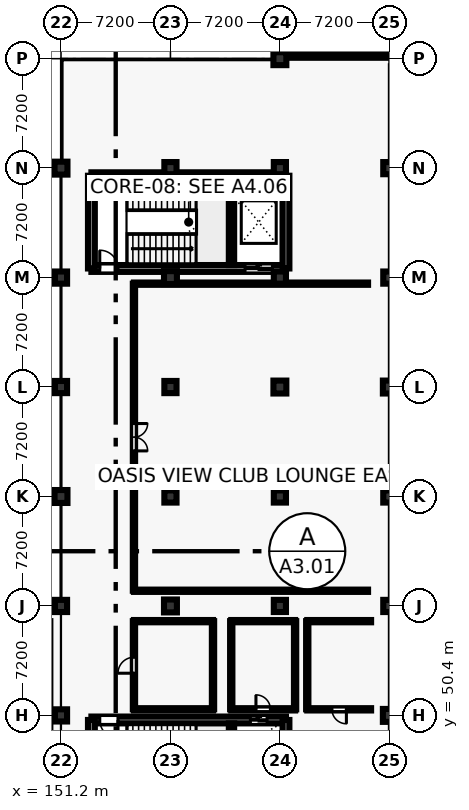
"""IFC4 building model, lengths in metres.
Left out: names, types, materials, properties, quantities, classifications, styles, units other than length and angle.
Written with IfcOpenShell. Run it as: python <this file> out.ifc"""

import sys

from ifc_helpers import new_model, si_unit, direction, frame, frame_2d, origin, origin_2d, place, context, subcontext, project, spatial, rectangle, circle, extrude, element, fill, save


model = new_model("IFC4")
c1 = context("Model", 3, precision=1e-05, world=origin(), true_north=direction((0.0, 1.0)))
c2 = subcontext(c1, "Body", "Model", "MODEL_VIEW")
j1 = project(units=[si_unit("LENGTHUNIT", "METRE"), si_unit("PLANEANGLEUNIT", "RADIAN")], contexts=[c1])
p1 = place(None, origin())
s1 = spatial("IfcSite", under=j1, at=p1, CompositionType="ELEMENT")
p2 = place(p1, origin())
s2 = spatial("IfcBuilding", under=s1, at=p2, CompositionType="ELEMENT")
p3 = place(p2, frame((0.0, 0.0, 5.4)))
s3 = spatial("IfcBuildingStorey", under=s2, at=p3, CompositionType="ELEMENT", Elevation=5.4)
p4 = place(p3, frame((151.2, 50.4, 0.0), z_axis=(0.0, 0.0, 1.0), x_axis=(1.0, 0.0, 0.0)))
e1 = element("IfcColumn", 1, at=p4, inside=s3, PredefinedType="COLUMN", context=c2, shape_type="SweptSolid", body=[
    extrude(rectangle(XDim=0.8, YDim=0.8, at=origin_2d()), origin(), (0.0, 0.0, 1.0), 4.2),
])
p5 = place(p3, frame((151.2, 57.6, 0.0), z_axis=(0.0, 0.0, 1.0), x_axis=(1.0, 0.0, 0.0)))
e2 = element("IfcColumn", 2, at=p5, inside=s3, PredefinedType="COLUMN", context=c2, shape_type="SweptSolid", body=[
    extrude(circle(Radius=0.4, at=origin_2d()), origin(), (0.0, 0.0, 1.0), 4.2),
])
p6 = place(p3, frame((151.2, 64.8, 0.0), z_axis=(0.0, 0.0, 1.0), x_axis=(1.0, 0.0, 0.0)))
e3 = element("IfcColumn", 3, at=p6, inside=s3, PredefinedType="COLUMN", context=c2, shape_type="SweptSolid", body=[
    extrude(rectangle(XDim=0.85, YDim=0.85, at=origin_2d()), origin(), (0.0, 0.0, 1.0), 4.2),
])
p7 = place(p3, frame((151.2, 72.0, 0.0), z_axis=(0.0, 0.0, 1.0), x_axis=(1.0, 0.0, 0.0)))
e4 = element("IfcColumn", 4, at=p7, inside=s3, PredefinedType="COLUMN", context=c2, shape_type="SweptSolid", body=[
    extrude(rectangle(XDim=0.8, YDim=0.8, at=origin_2d()), origin(), (0.0, 0.0, 1.0), 4.2),
])
p8 = place(p3, frame((151.2, 79.2, 0.0), z_axis=(0.0, 0.0, 1.0), x_axis=(1.0, 0.0, 0.0)))
e5 = element("IfcColumn", 5, at=p8, inside=s3, PredefinedType="COLUMN", context=c2, shape_type="SweptSolid", body=[
    extrude(circle(Radius=0.4, at=origin_2d()), origin(), (0.0, 0.0, 1.0), 4.2),
])
for number, where, z_axis, x_axis in (
    (6, (151.2, 86.4, 0.0), (0.0, 0.0, 1.0), (1.0, 0.0, 0.0)),
    (7, (158.4, 57.6, 0.0), (0.0, 0.0, 1.0), (1.0, 0.0, 0.0)),
):
    element("IfcColumn", number, at=place(p3, frame(where, z_axis=z_axis, x_axis=x_axis)), inside=s3, PredefinedType="COLUMN", context=c2, shape_type="SweptSolid", body=[
        extrude(rectangle(XDim=0.85, YDim=0.85, at=origin_2d()), origin(), (0.0, 0.0, 1.0), 4.2),
    ])
p9 = place(p3, frame((158.4, 64.8, 0.0), z_axis=(0.0, 0.0, 1.0), x_axis=(1.0, 0.0, 0.0)))
e8 = element("IfcColumn", 8, at=p9, inside=s3, PredefinedType="COLUMN", context=c2, shape_type="SweptSolid", body=[
    extrude(rectangle(XDim=0.8, YDim=0.8, at=origin_2d()), origin(), (0.0, 0.0, 1.0), 4.2),
])
p10 = place(p3, frame((158.4, 72.0, 0.0), z_axis=(0.0, 0.0, 1.0), x_axis=(1.0, 0.0, 0.0)))
e9 = element("IfcColumn", 9, at=p10, inside=s3, PredefinedType="COLUMN", context=c2, shape_type="SweptSolid", body=[
    extrude(circle(Radius=0.4, at=origin_2d()), origin(), (0.0, 0.0, 1.0), 4.2),
])
p11 = place(p3, frame((158.4, 79.2, 0.0), z_axis=(0.0, 0.0, 1.0), x_axis=(1.0, 0.0, 0.0)))
e10 = element("IfcColumn", 10, at=p11, inside=s3, PredefinedType="COLUMN", context=c2, shape_type="SweptSolid", body=[
    extrude(rectangle(XDim=0.85, YDim=0.85, at=origin_2d()), origin(), (0.0, 0.0, 1.0), 4.2),
])
for number, where, z_axis, x_axis in (
    (11, (158.4, 86.4, 0.0), (0.0, 0.0, 1.0), (1.0, 0.0, 0.0)),
    (12, (165.6, 57.6, 0.0), (0.0, 0.0, 1.0), (1.0, 0.0, 0.0)),
):
    element("IfcColumn", number, at=place(p3, frame(where, z_axis=z_axis, x_axis=x_axis)), inside=s3, PredefinedType="COLUMN", context=c2, shape_type="SweptSolid", body=[
        extrude(rectangle(XDim=0.8, YDim=0.8, at=origin_2d()), origin(), (0.0, 0.0, 1.0), 4.2),
    ])
p12 = place(p3, frame((165.6, 64.8, 0.0), z_axis=(0.0, 0.0, 1.0), x_axis=(1.0, 0.0, 0.0)))
e13 = element("IfcColumn", 13, at=p12, inside=s3, PredefinedType="COLUMN", context=c2, shape_type="SweptSolid", body=[
    extrude(circle(Radius=0.4, at=origin_2d()), origin(), (0.0, 0.0, 1.0), 4.2),
])
p13 = place(p3, frame((165.6, 72.0, 0.0), z_axis=(0.0, 0.0, 1.0), x_axis=(1.0, 0.0, 0.0)))
e14 = element("IfcColumn", 14, at=p13, inside=s3, PredefinedType="COLUMN", context=c2, shape_type="SweptSolid", body=[
    extrude(rectangle(XDim=0.85, YDim=0.85, at=origin_2d()), origin(), (0.0, 0.0, 1.0), 4.2),
])
p14 = place(p3, frame((165.6, 79.2, 0.0), z_axis=(0.0, 0.0, 1.0), x_axis=(1.0, 0.0, 0.0)))
e15 = element("IfcColumn", 15, at=p14, inside=s3, PredefinedType="COLUMN", context=c2, shape_type="SweptSolid", body=[
    extrude(rectangle(XDim=0.8, YDim=0.8, at=origin_2d()), origin(), (0.0, 0.0, 1.0), 4.2),
])
p15 = place(p3, frame((165.6, 86.4, 0.0), z_axis=(0.0, 0.0, 1.0), x_axis=(1.0, 0.0, 0.0)))
e16 = element("IfcColumn", 16, at=p15, inside=s3, PredefinedType="COLUMN", context=c2, shape_type="SweptSolid", body=[
    extrude(circle(Radius=0.4, at=origin_2d()), origin(), (0.0, 0.0, 1.0), 4.2),
])
for number, where, z_axis, x_axis in (
    (17, (165.6, 93.6, 0.0), (0.0, 0.0, 1.0), (1.0, 0.0, 0.0)),
    (18, (172.8, 50.4, 0.0), (0.0, 0.0, 1.0), (1.0, 0.0, 0.0)),
):
    element("IfcColumn", number, at=place(p3, frame(where, z_axis=z_axis, x_axis=x_axis)), inside=s3, PredefinedType="COLUMN", context=c2, shape_type="SweptSolid", body=[
        extrude(rectangle(XDim=0.85, YDim=0.85, at=origin_2d()), origin(), (0.0, 0.0, 1.0), 4.2),
    ])
p16 = place(p3, frame((172.8, 57.6, 0.0), z_axis=(0.0, 0.0, 1.0), x_axis=(1.0, 0.0, 0.0)))
e19 = element("IfcColumn", 19, at=p16, inside=s3, PredefinedType="COLUMN", context=c2, shape_type="SweptSolid", body=[
    extrude(rectangle(XDim=0.8, YDim=0.8, at=origin_2d()), origin(), (0.0, 0.0, 1.0), 4.2),
])
p17 = place(p3, frame((172.8, 64.8, 0.0), z_axis=(0.0, 0.0, 1.0), x_axis=(1.0, 0.0, 0.0)))
e20 = element("IfcColumn", 20, at=p17, inside=s3, PredefinedType="COLUMN", context=c2, shape_type="SweptSolid", body=[
    extrude(circle(Radius=0.4, at=origin_2d()), origin(), (0.0, 0.0, 1.0), 4.2),
])
p18 = place(p3, frame((172.8, 72.0, 0.0), z_axis=(0.0, 0.0, 1.0), x_axis=(1.0, 0.0, 0.0)))
e21 = element("IfcColumn", 21, at=p18, inside=s3, PredefinedType="COLUMN", context=c2, shape_type="SweptSolid", body=[
    extrude(rectangle(XDim=0.85, YDim=0.85, at=origin_2d()), origin(), (0.0, 0.0, 1.0), 4.2),
])
p19 = place(p3, frame((172.8, 79.2, 0.0), z_axis=(0.0, 0.0, 1.0), x_axis=(1.0, 0.0, 0.0)))
e22 = element("IfcColumn", 22, at=p19, inside=s3, PredefinedType="COLUMN", context=c2, shape_type="SweptSolid", body=[
    extrude(rectangle(XDim=0.8, YDim=0.8, at=origin_2d()), origin(), (0.0, 0.0, 1.0), 4.2),
])
p20 = place(p3, frame((172.8, 86.4, 0.0), z_axis=(0.0, 0.0, 1.0), x_axis=(1.0, 0.0, 0.0)))
e23 = element("IfcColumn", 23, at=p20, inside=s3, PredefinedType="COLUMN", context=c2, shape_type="SweptSolid", body=[
    extrude(circle(Radius=0.4, at=origin_2d()), origin(), (0.0, 0.0, 1.0), 4.2),
])
p21 = place(p3, frame((153.2, 50.1, 0.0), z_axis=(0.0, 0.0, 1.0), x_axis=(1.0, 0.0, 0.0)))
e24 = element("IfcWall", 24, at=p21, inside=s3, PredefinedType="SHEAR", context=c2, shape_type="SweptSolid", body=[
    extrude(rectangle(XDim=12.8, YDim=0.45, at=frame_2d((6.4, 0.0))), origin(), (0.0, 0.0, 1.0), 3.92),
])
p22 = place(p21, frame((0.55, 0.0, 0.0)))
e25 = element("IfcOpeningElement", 25, at=p22, cuts=e24, PredefinedType="OPENING", context=c2, shape_type="SweptSolid", body=[
    extrude(rectangle(XDim=1.2, YDim=2.25, at=frame_2d((0.6, 1.125))), frame((0.0, 0.235, 0.0), z_axis=(0.0, -1.0, 0.0), x_axis=(1.0, 0.0, 0.0)), (0.0, 0.0, 1.0), 0.47),
])
p23 = place(p21, frame((10.458, 0.0, 0.0)))
e26 = element("IfcOpeningElement", 26, at=p23, cuts=e24, PredefinedType="OPENING", context=c2, shape_type="SweptSolid", body=[
    extrude(rectangle(XDim=1.1, YDim=2.2, at=frame_2d((0.55, 1.1))), frame((0.0, 0.235, 0.0), z_axis=(0.0, -1.0, 0.0), x_axis=(1.0, 0.0, 0.0)), (0.0, 0.0, 1.0), 0.47),
])
for number, where, z_axis, x_axis in (
    (27, (153.2, 44.0, 0.0), (0.0, 0.0, 1.0), (0.0, 1.0, 0.0)),
    (28, (166.0, 44.0, 0.0), (0.0, 0.0, 1.0), (0.0, 1.0, 0.0)),
):
    element("IfcWall", number, at=place(p3, frame(where, z_axis=z_axis, x_axis=x_axis)), inside=s3, PredefinedType="SHEAR", context=c2, shape_type="SweptSolid", body=[
        extrude(rectangle(XDim=6.1, YDim=0.45, at=frame_2d((3.05, 0.0))), origin(), (0.0, 0.0, 1.0), 3.92),
    ])
p24 = place(p3, frame((162.416, 44.225, 0.0), z_axis=(0.0, 0.0, 1.0), x_axis=(0.0, 1.0, 0.0)))
e29 = element("IfcWall", 29, at=p24, inside=s3, PredefinedType="SHEAR", context=c2, shape_type="SweptSolid", body=[
    extrude(rectangle(XDim=5.65, YDim=0.35, at=frame_2d((2.825, 0.0))), origin(), (0.0, 0.0, 1.0), 3.92),
])
p25 = place(p3, frame((153.2, 79.8, 0.0), z_axis=(0.0, 0.0, 1.0), x_axis=(1.0, 0.0, 0.0)))
e30 = element("IfcWall", 30, at=p25, inside=s3, PredefinedType="SHEAR", context=c2, shape_type="SweptSolid", body=[
    extrude(rectangle(XDim=12.8, YDim=0.45, at=frame_2d((6.4, 0.0))), origin(), (0.0, 0.0, 1.0), 3.92),
])
p26 = place(p25, frame((0.55, 0.0, 0.0)))
e31 = element("IfcOpeningElement", 31, at=p26, cuts=e30, PredefinedType="OPENING", context=c2, shape_type="SweptSolid", body=[
    extrude(rectangle(XDim=1.2, YDim=2.25, at=frame_2d((0.6, 1.125))), frame((0.0, 0.235, 0.0), z_axis=(0.0, -1.0, 0.0), x_axis=(1.0, 0.0, 0.0)), (0.0, 0.0, 1.0), 0.47),
])
p27 = place(p25, frame((10.108, 0.0, 0.0)))
e32 = element("IfcOpeningElement", 32, at=p27, cuts=e30, PredefinedType="OPENING", context=c2, shape_type="SweptSolid", body=[
    extrude(rectangle(XDim=1.8, YDim=2.4, at=frame_2d((0.9, 1.2))), frame((0.0, 0.235, 0.0), z_axis=(0.0, -1.0, 0.0), x_axis=(1.0, 0.0, 0.0)), (0.0, 0.0, 1.0), 0.47),
])
p28 = place(p3, frame((153.2, 85.9, 0.0), z_axis=(0.0, 0.0, 1.0), x_axis=(1.0, 0.0, 0.0)))
e33 = element("IfcWall", 33, at=p28, inside=s3, PredefinedType="SHEAR", context=c2, shape_type="SweptSolid", body=[
    extrude(rectangle(XDim=12.8, YDim=0.45, at=frame_2d((6.4, 0.0))), origin(), (0.0, 0.0, 1.0), 3.92),
])
for number, where, z_axis, x_axis in (
    (34, (153.2, 79.8, 0.0), (0.0, 0.0, 1.0), (0.0, 1.0, 0.0)),
    (35, (166.0, 79.8, 0.0), (0.0, 0.0, 1.0), (0.0, 1.0, 0.0)),
):
    element("IfcWall", number, at=place(p3, frame(where, z_axis=z_axis, x_axis=x_axis)), inside=s3, PredefinedType="SHEAR", context=c2, shape_type="SweptSolid", body=[
        extrude(rectangle(XDim=6.1, YDim=0.45, at=frame_2d((3.05, 0.0))), origin(), (0.0, 0.0, 1.0), 3.92),
    ])
p29 = place(p3, frame((162.416, 80.025, 0.0), z_axis=(0.0, 0.0, 1.0), x_axis=(0.0, 1.0, 0.0)))
e36 = element("IfcWall", 36, at=p29, inside=s3, PredefinedType="SHEAR", context=c2, shape_type="SweptSolid", body=[
    extrude(rectangle(XDim=5.65, YDim=0.35, at=frame_2d((2.825, 0.0))), origin(), (0.0, 0.0, 1.0), 3.92),
])
p30 = place(p3, frame((165.6, 93.85, 0.0), z_axis=(0.0, 0.0, 1.0), x_axis=(0.0, 1.0, 0.0)))
e37 = element("IfcWall", 37, at=p30, inside=s3, PredefinedType="SOLIDWALL", context=c2, shape_type="SweptSolid", body=[
    extrude(rectangle(XDim=6.7, YDim=0.29, at=frame_2d((3.35, 0.0))), origin(), (0.0, 0.0, 1.0), 4.78),
])
p31 = place(p30, frame((2.55, 0.0, 0.9)))
e38 = element("IfcOpeningElement", 38, at=p31, cuts=e37, PredefinedType="OPENING", context=c2, shape_type="SweptSolid", body=[
    extrude(rectangle(XDim=1.6, YDim=1.1, at=frame_2d((0.8, 0.55))), frame((0.0, 0.155, 0.0), z_axis=(0.0, -1.0, 0.0), x_axis=(1.0, 0.0, 0.0)), (0.0, 0.0, 1.0), 0.31),
])
p32 = place(p3, frame((165.75, 93.75, 0.0), z_axis=(0.0, 0.0, 1.0), x_axis=(1.0, 0.0, 0.0)))
e39 = element("IfcWall", 39, at=p32, inside=s3, PredefinedType="PARAPET", context=c2, shape_type="SweptSolid", body=[
    extrude(rectangle(XDim=6.9, YDim=0.18, at=frame_2d((3.45, 0.0))), origin(), (0.0, 0.0, 1.0), 1.15),
])
p33 = place(p3, frame((172.65, 93.75, 0.0), z_axis=(0.0, 0.0, 1.0), x_axis=(0.0, 1.0, 0.0)))
e40 = element("IfcWall", 40, at=p33, inside=s3, PredefinedType="PARAPET", context=c2, shape_type="SweptSolid", body=[
    extrude(rectangle(XDim=28.5, YDim=0.18, at=frame_2d((14.25, 0.0))), origin(), (0.0, 0.0, 1.0), 1.15),
])
for number, where, z_axis, x_axis in (
    (41, (156.0, 58.6, 0.0), (0.0, 0.0, 1.0), (1.0, 0.0, 0.0)),
    (42, (171.4, 78.8, 0.0), (0.0, 0.0, 1.0), (-1.0, 0.0, 0.0)),
):
    element("IfcWall", number, at=place(p3, frame(where, z_axis=z_axis, x_axis=x_axis)), inside=s3, PredefinedType="PARTITIONING", context=c2, shape_type="SweptSolid", body=[
        extrude(rectangle(XDim=15.4, YDim=0.15, at=frame_2d((7.7, 0.0))), origin(), (0.0, 0.0, 1.0), 2.98),
    ])
p34 = place(p3, frame((156.0, 78.8, 0.0), z_axis=(0.0, 0.0, 1.0), x_axis=(0.0, -1.0, 0.0)))
e43 = element("IfcWall", 43, at=p34, inside=s3, PredefinedType="PARTITIONING", context=c2, shape_type="SweptSolid", body=[
    extrude(rectangle(XDim=20.2, YDim=0.15, at=frame_2d((10.1, 0.0))), origin(), (0.0, 0.0, 1.0), 2.98),
])
p35 = place(p34, frame((9.2, 0.0, 0.0)))
e44 = element("IfcOpeningElement", 44, at=p35, cuts=e43, PredefinedType="OPENING", context=c2, shape_type="SweptSolid", body=[
    extrude(rectangle(XDim=1.8, YDim=2.3, at=frame_2d((0.9, 1.15))), frame((0.0, 0.085, 0.0), z_axis=(0.0, -1.0, 0.0), x_axis=(1.0, 0.0, 0.0)), (0.0, 0.0, 1.0), 0.17),
])
p36 = place(p3, frame((156.0, 50.8, 0.0), z_axis=(0.0, 0.0, 1.0), x_axis=(1.0, 0.0, 0.0)))
e45 = element("IfcWall", 45, at=p36, inside=s3, PredefinedType="PARTITIONING", context=c2, shape_type="SweptSolid", body=[
    extrude(rectangle(XDim=5.2, YDim=0.15, at=frame_2d((2.6, 0.0))), origin(), (0.0, 0.0, 1.0), 2.98),
])
p37 = place(p3, frame((161.2, 50.8, 0.0), z_axis=(0.0, 0.0, 1.0), x_axis=(0.0, 1.0, 0.0)))
e46 = element("IfcWall", 46, at=p37, inside=s3, PredefinedType="PARTITIONING", context=c2, shape_type="SweptSolid", body=[
    extrude(rectangle(XDim=5.8, YDim=0.15, at=frame_2d((2.9, 0.0))), origin(), (0.0, 0.0, 1.0), 2.98),
])
p38 = place(p3, frame((161.2, 56.6, 0.0), z_axis=(0.0, 0.0, 1.0), x_axis=(-1.0, 0.0, 0.0)))
e47 = element("IfcWall", 47, at=p38, inside=s3, PredefinedType="PARTITIONING", context=c2, shape_type="SweptSolid", body=[
    extrude(rectangle(XDim=5.2, YDim=0.15, at=frame_2d((2.6, 0.0))), origin(), (0.0, 0.0, 1.0), 2.98),
])
p39 = place(p3, frame((156.0, 56.6, 0.0), z_axis=(0.0, 0.0, 1.0), x_axis=(0.0, -1.0, 0.0)))
e48 = element("IfcWall", 48, at=p39, inside=s3, PredefinedType="PARTITIONING", context=c2, shape_type="SweptSolid", body=[
    extrude(rectangle(XDim=5.8, YDim=0.15, at=frame_2d((2.9, 0.0))), origin(), (0.0, 0.0, 1.0), 2.98),
])
p40 = place(p39, frame((2.375, 0.0, 0.0)))
e49 = element("IfcOpeningElement", 49, at=p40, cuts=e48, PredefinedType="OPENING", context=c2, shape_type="SweptSolid", body=[
    extrude(rectangle(XDim=1.05, YDim=2.2, at=frame_2d((0.525, 1.1))), frame((0.0, 0.085, 0.0), z_axis=(0.0, -1.0, 0.0), x_axis=(1.0, 0.0, 0.0)), (0.0, 0.0, 1.0), 0.17),
])
p41 = place(p3, frame((162.4, 50.8, 0.0), z_axis=(0.0, 0.0, 1.0), x_axis=(1.0, 0.0, 0.0)))
e50 = element("IfcWall", 50, at=p41, inside=s3, PredefinedType="PARTITIONING", context=c2, shape_type="SweptSolid", body=[
    extrude(rectangle(XDim=4.2, YDim=0.15, at=frame_2d((2.1, 0.0))), origin(), (0.0, 0.0, 1.0), 2.98),
])
p42 = place(p41, frame((1.625, 0.0, 0.0)))
e51 = element("IfcOpeningElement", 51, at=p42, cuts=e50, PredefinedType="OPENING", context=c2, shape_type="SweptSolid", body=[
    extrude(rectangle(XDim=0.95, YDim=2.15, at=frame_2d((0.475, 1.075))), frame((0.0, 0.085, 0.0), z_axis=(0.0, -1.0, 0.0), x_axis=(1.0, 0.0, 0.0)), (0.0, 0.0, 1.0), 0.17),
])
p43 = place(p3, frame((166.6, 50.8, 0.0), z_axis=(0.0, 0.0, 1.0), x_axis=(0.0, 1.0, 0.0)))
e52 = element("IfcWall", 52, at=p43, inside=s3, PredefinedType="PARTITIONING", context=c2, shape_type="SweptSolid", body=[
    extrude(rectangle(XDim=5.8, YDim=0.15, at=frame_2d((2.9, 0.0))), origin(), (0.0, 0.0, 1.0), 2.98),
])
p44 = place(p3, frame((166.6, 56.6, 0.0), z_axis=(0.0, 0.0, 1.0), x_axis=(-1.0, 0.0, 0.0)))
e53 = element("IfcWall", 53, at=p44, inside=s3, PredefinedType="PARTITIONING", context=c2, shape_type="SweptSolid", body=[
    extrude(rectangle(XDim=4.2, YDim=0.15, at=frame_2d((2.1, 0.0))), origin(), (0.0, 0.0, 1.0), 2.98),
])
p45 = place(p3, frame((162.4, 56.6, 0.0), z_axis=(0.0, 0.0, 1.0), x_axis=(0.0, -1.0, 0.0)))
e54 = element("IfcWall", 54, at=p45, inside=s3, PredefinedType="PARTITIONING", context=c2, shape_type="SweptSolid", body=[
    extrude(rectangle(XDim=5.8, YDim=0.15, at=frame_2d((2.9, 0.0))), origin(), (0.0, 0.0, 1.0), 2.98),
])
p46 = place(p3, frame((167.4, 50.8, 0.0), z_axis=(0.0, 0.0, 1.0), x_axis=(1.0, 0.0, 0.0)))
e55 = element("IfcWall", 55, at=p46, inside=s3, PredefinedType="PARTITIONING", context=c2, shape_type="SweptSolid", body=[
    extrude(rectangle(XDim=4.2, YDim=0.15, at=frame_2d((2.1, 0.0))), origin(), (0.0, 0.0, 1.0), 2.98),
])
p47 = place(p46, frame((1.625, 0.0, 0.0)))
e56 = element("IfcOpeningElement", 56, at=p47, cuts=e55, PredefinedType="OPENING", context=c2, shape_type="SweptSolid", body=[
    extrude(rectangle(XDim=0.95, YDim=2.15, at=frame_2d((0.475, 1.075))), frame((0.0, 0.085, 0.0), z_axis=(0.0, -1.0, 0.0), x_axis=(1.0, 0.0, 0.0)), (0.0, 0.0, 1.0), 0.17),
])
p48 = place(p3, frame((171.6, 56.6, 0.0), z_axis=(0.0, 0.0, 1.0), x_axis=(-1.0, 0.0, 0.0)))
e57 = element("IfcWall", 57, at=p48, inside=s3, PredefinedType="PARTITIONING", context=c2, shape_type="SweptSolid", body=[
    extrude(rectangle(XDim=4.2, YDim=0.15, at=frame_2d((2.1, 0.0))), origin(), (0.0, 0.0, 1.0), 2.98),
])
p49 = place(p3, frame((167.4, 56.6, 0.0), z_axis=(0.0, 0.0, 1.0), x_axis=(0.0, -1.0, 0.0)))
e58 = element("IfcWall", 58, at=p49, inside=s3, PredefinedType="PARTITIONING", context=c2, shape_type="SweptSolid", body=[
    extrude(rectangle(XDim=5.8, YDim=0.15, at=frame_2d((2.9, 0.0))), origin(), (0.0, 0.0, 1.0), 2.98),
])
p50 = place(p22, frame((1.2, 0.0, 0.0), z_axis=(0.0, 0.0, 1.0), x_axis=(-1.0, 0.0, 0.0)))
e59 = element("IfcDoor", 59, at=p50, inside=s3, OperationType="SINGLE_SWING_RIGHT", PredefinedType="DOOR", context=c2, shape_type="SweptSolid", body=[
    extrude(rectangle(XDim=1.2, YDim=2.25, at=frame_2d((0.6, 1.125))), frame((0.0, 0.025, 0.0), z_axis=(0.0, -1.0, 0.0), x_axis=(1.0, 0.0, 0.0)), (0.0, 0.0, 1.0), 0.05),
])
fill(e25, e59)
p51 = place(p23, origin())
e60 = element("IfcDoor", 60, at=p51, inside=s3, OperationType="SLIDING_TO_LEFT", PredefinedType="DOOR", context=c2, shape_type="SweptSolid", body=[
    extrude(rectangle(XDim=1.1, YDim=2.2, at=frame_2d((0.55, 1.1))), frame((0.0, 0.025, 0.0), z_axis=(0.0, -1.0, 0.0), x_axis=(1.0, 0.0, 0.0)), (0.0, 0.0, 1.0), 0.05),
])
fill(e26, e60)
p52 = place(p26, origin())
e61 = element("IfcDoor", 61, at=p52, inside=s3, OperationType="SINGLE_SWING_LEFT", PredefinedType="DOOR", context=c2, shape_type="SweptSolid", body=[
    extrude(rectangle(XDim=1.2, YDim=2.25, at=frame_2d((0.6, 1.125))), frame((0.0, 0.025, 0.0), z_axis=(0.0, -1.0, 0.0), x_axis=(1.0, 0.0, 0.0)), (0.0, 0.0, 1.0), 0.05),
])
fill(e31, e61)
p53 = place(p27, origin())
e62 = element("IfcDoor", 62, at=p53, inside=s3, OperationType="SLIDING_TO_LEFT", PredefinedType="DOOR", context=c2, shape_type="SweptSolid", body=[
    extrude(rectangle(XDim=1.8, YDim=2.4, at=frame_2d((0.9, 1.2))), frame((0.0, 0.025, 0.0), z_axis=(0.0, -1.0, 0.0), x_axis=(1.0, 0.0, 0.0)), (0.0, 0.0, 1.0), 0.05),
])
fill(e32, e62)
p54 = place(p35, origin())
e63 = element("IfcDoor", 63, at=p54, inside=s3, OperationType="DOUBLE_DOOR_SINGLE_SWING", PredefinedType="DOOR", context=c2, shape_type="SweptSolid", body=[
    extrude(rectangle(XDim=1.8, YDim=2.3, at=frame_2d((0.9, 1.15))), frame((0.0, 0.025, 0.0), z_axis=(0.0, -1.0, 0.0), x_axis=(1.0, 0.0, 0.0)), (0.0, 0.0, 1.0), 0.05),
])
fill(e44, e63)
p55 = place(p40, frame((1.05, 0.0, 0.0), z_axis=(0.0, 0.0, 1.0), x_axis=(-1.0, 0.0, 0.0)))
e64 = element("IfcDoor", 64, at=p55, inside=s3, OperationType="SINGLE_SWING_RIGHT", PredefinedType="DOOR", context=c2, shape_type="SweptSolid", body=[
    extrude(rectangle(XDim=1.05, YDim=2.2, at=frame_2d((0.525, 1.1))), frame((0.0, 0.025, 0.0), z_axis=(0.0, -1.0, 0.0), x_axis=(1.0, 0.0, 0.0)), (0.0, 0.0, 1.0), 0.05),
])
fill(e49, e64)
p56 = place(p42, origin())
e65 = element("IfcDoor", 65, at=p56, inside=s3, OperationType="SINGLE_SWING_LEFT", PredefinedType="DOOR", context=c2, shape_type="SweptSolid", body=[
    extrude(rectangle(XDim=0.95, YDim=2.15, at=frame_2d((0.475, 1.075))), frame((0.0, 0.025, 0.0), z_axis=(0.0, -1.0, 0.0), x_axis=(1.0, 0.0, 0.0)), (0.0, 0.0, 1.0), 0.05),
])
fill(e51, e65)
p57 = place(p47, frame((0.95, 0.0, 0.0), z_axis=(0.0, 0.0, 1.0), x_axis=(-1.0, 0.0, 0.0)))
e66 = element("IfcDoor", 66, at=p57, inside=s3, OperationType="SINGLE_SWING_RIGHT", PredefinedType="DOOR", context=c2, shape_type="SweptSolid", body=[
    extrude(rectangle(XDim=0.95, YDim=2.15, at=frame_2d((0.475, 1.075))), frame((0.0, 0.025, 0.0), z_axis=(0.0, -1.0, 0.0), x_axis=(1.0, 0.0, 0.0)), (0.0, 0.0, 1.0), 0.05),
])
fill(e56, e66)
save(model, sys.argv[1])
